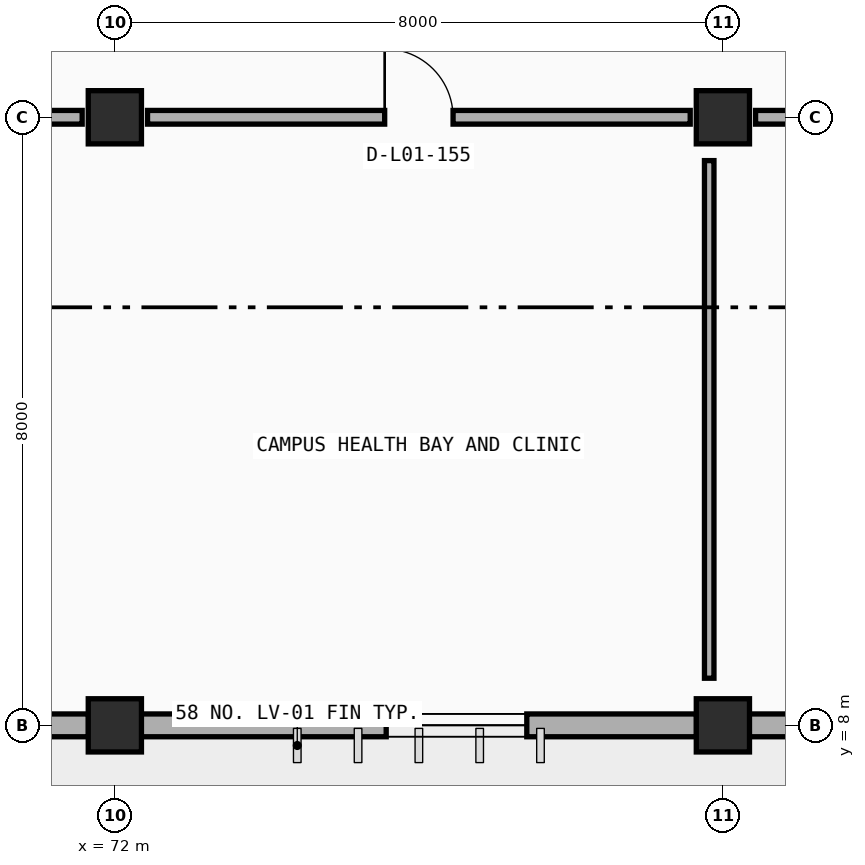
"""IFC4 building model, lengths in metres.
Left out: names, types, materials, properties, quantities, classifications, styles, units other than length and angle.
Written with IfcOpenShell. Run it as: python <this file> out.ifc"""

import sys

from ifc_helpers import new_model, si_unit, direction, frame, frame_2d, origin, origin_2d, place, context, subcontext, project, spatial, rectangle, extrude, element, fill, save


model = new_model("IFC4")
c1 = context("Model", 3, precision=1e-05, world=origin(), true_north=direction((0.0, 1.0)))
c2 = subcontext(c1, "Body", "Model", "MODEL_VIEW")
j1 = project(units=[si_unit("LENGTHUNIT", "METRE"), si_unit("PLANEANGLEUNIT", "RADIAN")], contexts=[c1])
p1 = place(None, origin())
s1 = spatial("IfcSite", under=j1, at=p1, CompositionType="ELEMENT")
p2 = place(p1, origin())
s2 = spatial("IfcBuilding", under=s1, at=p2, CompositionType="ELEMENT")
p3 = place(p2, origin())
s3 = spatial("IfcBuildingStorey", under=s2, at=p3, CompositionType="ELEMENT", Elevation=0.0)
for number, where, z_axis, x_axis in (
    (1, (72.0, 8.0, 0.0), (0.0, 0.0, 1.0), (1.0, 0.0, 0.0)),
    (2, (80.0, 8.0, 0.0), (0.0, 0.0, 1.0), (1.0, 0.0, 0.0)),
    (3, (72.0, 16.0, 0.0), (0.0, 0.0, 1.0), (1.0, 0.0, 0.0)),
    (4, (80.0, 16.0, 0.0), (0.0, 0.0, 1.0), (1.0, 0.0, 0.0)),
):
    element("IfcColumn", number, at=place(p3, frame(where, z_axis=z_axis, x_axis=x_axis)), inside=s3, PredefinedType="COLUMN", context=c2, shape_type="SweptSolid", body=[
        extrude(rectangle(XDim=0.7, YDim=0.7, at=origin_2d()), origin(), (0.0, 0.0, 1.0), 4.8),
    ])
p4 = place(p3, frame((71.653, 8.0, 0.0), z_axis=(0.0, 0.0, 1.0), x_axis=(-1.0, 0.0, 0.0)))
e5 = element("IfcWall", 5, at=p4, inside=s3, PredefinedType="STANDARD", context=c2, shape_type="SweptSolid", body=[
    extrude(rectangle(XDim=7.306, YDim=0.3, at=frame_2d((3.653, 0.0))), origin(), (0.0, 0.0, 1.0), 3.91),
])
p5 = place(p4, frame((2.753, 0.0, 0.0)))
e6 = element("IfcOpeningElement", 6, at=p5, cuts=e5, PredefinedType="OPENING", context=c2, shape_type="SweptSolid", body=[
    extrude(rectangle(XDim=1.8, YDim=2.3, at=frame_2d((0.9, 1.15))), frame((0.0, 0.16, 0.0), z_axis=(0.0, -1.0, 0.0), x_axis=(1.0, 0.0, 0.0)), (0.0, 0.0, 1.0), 0.32),
])
p6 = place(p3, frame((79.653, 8.0, 0.0), z_axis=(0.0, 0.0, 1.0), x_axis=(-1.0, 0.0, 0.0)))
e7 = element("IfcWall", 7, at=p6, inside=s3, PredefinedType="STANDARD", context=c2, shape_type="SweptSolid", body=[
    extrude(rectangle(XDim=7.306, YDim=0.3, at=frame_2d((3.653, 0.0))), origin(), (0.0, 0.0, 1.0), 3.91),
])
p7 = place(p6, frame((2.233, 0.0, 0.9)))
e8 = element("IfcOpeningElement", 8, at=p7, cuts=e7, PredefinedType="OPENING", context=c2, shape_type="SweptSolid", body=[
    extrude(rectangle(XDim=1.85, YDim=1.25, at=frame_2d((0.925, 0.625))), frame((0.0, 0.16, 0.0), z_axis=(0.0, -1.0, 0.0), x_axis=(1.0, 0.0, 0.0)), (0.0, 0.0, 1.0), 0.32),
])
p8 = place(p3, frame((87.653, 8.0, 0.0), z_axis=(0.0, 0.0, 1.0), x_axis=(-1.0, 0.0, 0.0)))
e9 = element("IfcWall", 9, at=p8, inside=s3, PredefinedType="STANDARD", context=c2, shape_type="SweptSolid", body=[
    extrude(rectangle(XDim=7.306, YDim=0.3, at=frame_2d((3.653, 0.0))), origin(), (0.0, 0.0, 1.0), 3.91),
])
p9 = place(p8, frame((2.233, 0.0, 0.9)))
e10 = element("IfcOpeningElement", 10, at=p9, cuts=e9, PredefinedType="OPENING", context=c2, shape_type="SweptSolid", body=[
    extrude(rectangle(XDim=1.45, YDim=1.25, at=frame_2d((0.725, 0.625))), frame((0.0, 0.16, 0.0), z_axis=(0.0, -1.0, 0.0), x_axis=(1.0, 0.0, 0.0)), (0.0, 0.0, 1.0), 0.32),
])
p10 = place(p3, frame((56.43, 16.0, 0.0), z_axis=(0.0, 0.0, 1.0), x_axis=(1.0, 0.0, 0.0)))
e11 = element("IfcWall", 11, at=p10, inside=s3, PredefinedType="PARTITIONING", context=c2, shape_type="SweptSolid", body=[
    extrude(rectangle(XDim=15.14, YDim=0.18, at=frame_2d((7.57, 0.0))), origin(), (0.0, 0.0, 1.0), 3.81),
])
p11 = place(p10, frame((2.61, 0.0, 0.0)))
e12 = element("IfcOpeningElement", 12, at=p11, cuts=e11, PredefinedType="OPENING", context=c2, shape_type="SweptSolid", body=[
    extrude(rectangle(XDim=1.92, YDim=2.3, at=frame_2d((0.96, 1.15))), frame((0.0, 0.1, 0.0), z_axis=(0.0, -1.0, 0.0), x_axis=(1.0, 0.0, 0.0)), (0.0, 0.0, 1.0), 0.2),
])
p12 = place(p3, frame((72.43, 16.0, 0.0), z_axis=(0.0, 0.0, 1.0), x_axis=(1.0, 0.0, 0.0)))
e13 = element("IfcWall", 13, at=p12, inside=s3, PredefinedType="PARTITIONING", context=c2, shape_type="SweptSolid", body=[
    extrude(rectangle(XDim=7.14, YDim=0.18, at=frame_2d((3.57, 0.0))), origin(), (0.0, 0.0, 1.0), 3.81),
])
p13 = place(p12, frame((3.12, 0.0, 0.0)))
e14 = element("IfcOpeningElement", 14, at=p13, cuts=e13, PredefinedType="OPENING", context=c2, shape_type="SweptSolid", body=[
    extrude(rectangle(XDim=0.9, YDim=2.1, at=frame_2d((0.45, 1.05))), frame((0.0, 0.1, 0.0), z_axis=(0.0, -1.0, 0.0), x_axis=(1.0, 0.0, 0.0)), (0.0, 0.0, 1.0), 0.2),
])
p14 = place(p3, frame((79.82, 8.62, 0.0), z_axis=(0.0, 0.0, 1.0), x_axis=(0.0, 1.0, 0.0)))
e15 = element("IfcWall", 15, at=p14, inside=s3, PredefinedType="PARTITIONING", context=c2, shape_type="SweptSolid", body=[
    extrude(rectangle(XDim=6.81, YDim=0.125, at=frame_2d((3.405, 0.0))), origin(), (0.0, 0.0, 1.0), 3.76),
])
p15 = place(p3, frame((80.43, 16.0, 0.0), z_axis=(0.0, 0.0, 1.0), x_axis=(1.0, 0.0, 0.0)))
e16 = element("IfcWall", 16, at=p15, inside=s3, PredefinedType="PARTITIONING", context=c2, shape_type="SweptSolid", body=[
    extrude(rectangle(XDim=7.14, YDim=0.18, at=frame_2d((3.57, 0.0))), origin(), (0.0, 0.0, 1.0), 3.81),
])
p16 = place(p15, frame((3.08, 0.0, 0.0)))
e17 = element("IfcOpeningElement", 17, at=p16, cuts=e16, PredefinedType="OPENING", context=c2, shape_type="SweptSolid", body=[
    extrude(rectangle(XDim=0.98, YDim=2.1, at=frame_2d((0.49, 1.05))), frame((0.0, 0.1, 0.0), z_axis=(0.0, -1.0, 0.0), x_axis=(1.0, 0.0, 0.0)), (0.0, 0.0, 1.0), 0.2),
])
p17 = place(p7, origin())
e18 = element("IfcWindow", 18, at=p17, inside=s3, PartitioningType="DOUBLE_PANEL_VERTICAL", PredefinedType="WINDOW", context=c2, shape_type="SweptSolid", body=[
    extrude(rectangle(XDim=1.85, YDim=1.25, at=frame_2d((0.925, 0.625))), frame((0.0, 0.03, 0.0), z_axis=(0.0, -1.0, 0.0), x_axis=(1.0, 0.0, 0.0)), (0.0, 0.0, 1.0), 0.06),
])
fill(e8, e18)
p18 = place(p13, origin())
e19 = element("IfcDoor", 19, at=p18, inside=s3, OperationType="SINGLE_SWING_LEFT", PredefinedType="DOOR", context=c2, shape_type="SweptSolid", body=[
    extrude(rectangle(XDim=0.9, YDim=2.1, at=frame_2d((0.45, 1.05))), frame((0.0, 0.025, 0.0), z_axis=(0.0, -1.0, 0.0), x_axis=(1.0, 0.0, 0.0)), (0.0, 0.0, 1.0), 0.05),
])
fill(e14, e19)
save(model, sys.argv[1])
